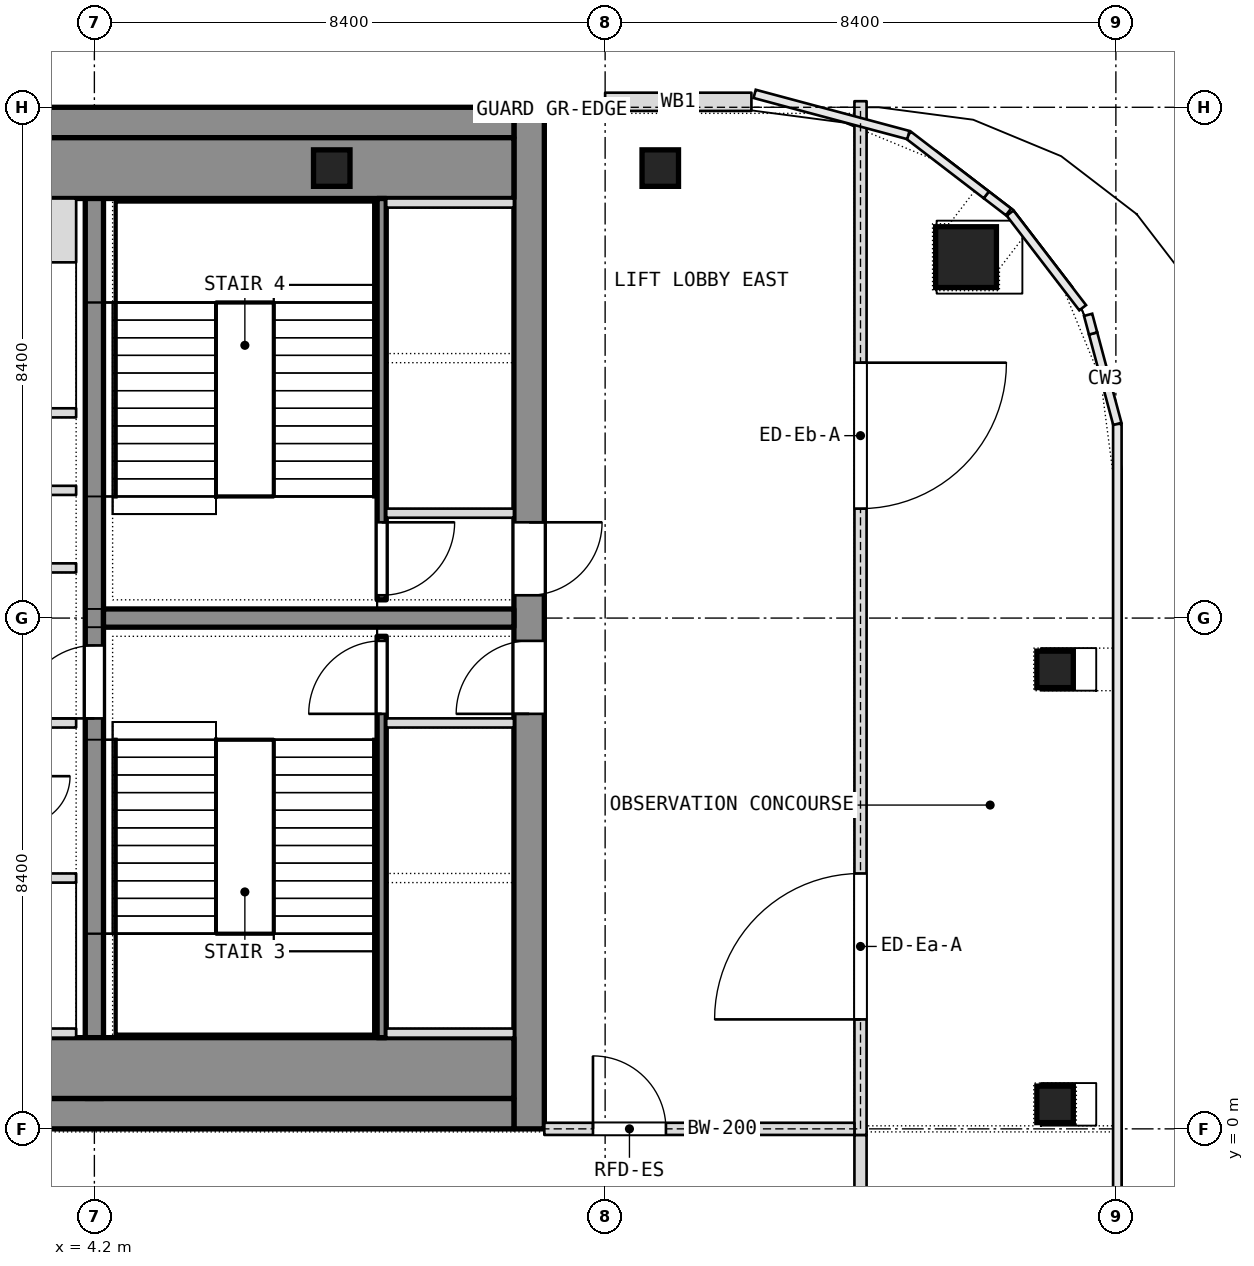
"""IFC4 building model, lengths in metres.
Left out: names, types, materials, properties, quantities, classifications, styles, units other than length and angle.
Written with IfcOpenShell. Run it as: python <this file> out.ifc"""

import sys

from ifc_helpers import new_model, si_unit, direction, frame, frame_2d, origin, origin_2d, place, context, subcontext, project, spatial, rectangle, extrude, element, fill, save


model = new_model("IFC4")
c1 = context("Model", 3, precision=1e-05, world=origin(), true_north=direction((0.0, 1.0)))
c2 = subcontext(c1, "Body", "Model", "MODEL_VIEW")
j1 = project(units=[si_unit("LENGTHUNIT", "METRE"), si_unit("PLANEANGLEUNIT", "RADIAN")], contexts=[c1])
p1 = place(None, origin())
s1 = spatial("IfcSite", under=j1, at=p1, CompositionType="ELEMENT")
p2 = place(p1, origin())
s2 = spatial("IfcBuilding", under=s1, at=p2, CompositionType="ELEMENT")
p3 = place(p2, frame((0.0, 0.0, 281.3)))
s3 = spatial("IfcBuildingStorey", under=s2, at=p3, CompositionType="ELEMENT", Elevation=281.3)
p4 = place(p3, frame((11.35, 0.0, 0.0), z_axis=(0.0, 0.0, 1.0), x_axis=(0.0, 1.0, 0.0)))
e1 = element("IfcWall", 1, at=p4, inside=s3, PredefinedType="SHEAR", context=c2, shape_type="SweptSolid", body=[
    extrude(rectangle(XDim=16.8, YDim=0.5, at=frame_2d((8.4, 0.0))), origin(), (0.0, 0.0, 1.0), 7.2),
])
p5 = place(p4, frame((6.825, 0.0, 0.0)))
e2 = element("IfcOpeningElement", 2, at=p5, cuts=e1, PredefinedType="OPENING", context=c2, shape_type="SweptSolid", body=[
    extrude(rectangle(XDim=1.2, YDim=2.1, at=frame_2d((0.6, 1.05))), frame((0.0, 0.25, 0.0), z_axis=(0.0, -1.0, 0.0), x_axis=(1.0, 0.0, 0.0)), (0.0, 0.0, 1.0), 0.5),
])
p6 = place(p4, frame((8.775, 0.0, 0.0)))
e3 = element("IfcOpeningElement", 3, at=p6, cuts=e1, PredefinedType="OPENING", context=c2, shape_type="SweptSolid", body=[
    extrude(rectangle(XDim=1.2, YDim=2.1, at=frame_2d((0.6, 1.05))), frame((0.0, 0.25, 0.0), z_axis=(0.0, -1.0, 0.0), x_axis=(1.0, 0.0, 0.0)), (0.0, 0.0, 1.0), 0.5),
])
p7 = place(p3, frame((-11.1, 0.25, 0.0), z_axis=(0.0, 0.0, 1.0), x_axis=(1.0, 0.0, 0.0)))
e4 = element("IfcWall", 4, at=p7, inside=s3, PredefinedType="SHEAR", context=c2, shape_type="SweptSolid", body=[
    extrude(rectangle(XDim=22.2, YDim=0.5, at=frame_2d((11.1, 0.0))), origin(), (0.0, 0.0, 1.0), 7.2),
])
p8 = place(p7, frame((10.85, 0.0, 0.0)))
e5 = element("IfcOpeningElement", 5, at=p8, cuts=e4, PredefinedType="OPENING", context=c2, shape_type="SweptSolid", body=[
    extrude(rectangle(XDim=1.4, YDim=2.1, at=frame_2d((0.7, 1.05))), frame((0.0, 0.25, 0.0), z_axis=(0.0, -1.0, 0.0), x_axis=(1.0, 0.0, 0.0)), (0.0, 0.0, 1.0), 0.5),
])
p9 = place(p3, frame((-11.1, 16.55, 0.0), z_axis=(0.0, 0.0, 1.0), x_axis=(1.0, 0.0, 0.0)))
e6 = element("IfcWall", 6, at=p9, inside=s3, PredefinedType="SHEAR", context=c2, shape_type="SweptSolid", body=[
    extrude(rectangle(XDim=22.2, YDim=0.5, at=frame_2d((11.1, 0.0))), origin(), (0.0, 0.0, 1.0), 7.2),
])
p10 = place(p3, frame((4.2, 0.5, 0.0), z_axis=(0.0, 0.0, 1.0), x_axis=(0.0, 1.0, 0.0)))
e7 = element("IfcWall", 7, at=p10, inside=s3, PredefinedType="SHEAR", context=c2, shape_type="SweptSolid", body=[
    extrude(rectangle(XDim=15.8, YDim=0.3, at=frame_2d((7.9, 0.0))), origin(), (0.0, 0.0, 1.0), 7.2),
])
p11 = place(p10, frame((6.25, 0.0, 0.0)))
e8 = element("IfcOpeningElement", 8, at=p11, cuts=e7, PredefinedType="OPENING", context=c2, shape_type="SweptSolid", body=[
    extrude(rectangle(XDim=1.2, YDim=2.1, at=frame_2d((0.6, 1.05))), frame((0.0, 0.15, 0.0), z_axis=(0.0, -1.0, 0.0), x_axis=(1.0, 0.0, 0.0)), (0.0, 0.0, 1.0), 0.3),
])
p12 = place(p3, frame((4.35, 8.4, 0.0), z_axis=(0.0, 0.0, 1.0), x_axis=(1.0, 0.0, 0.0)))
e9 = element("IfcWall", 9, at=p12, inside=s3, PredefinedType="SHEAR", context=c2, shape_type="SweptSolid", body=[
    extrude(rectangle(XDim=6.75, YDim=0.3, at=frame_2d((3.375, 0.0))), origin(), (0.0, 0.0, 1.0), 7.2),
])
p13 = place(p3, frame((18.535, 14.335, 0.0), z_axis=(0.0, 0.0, 1.0), x_axis=(1.0, 0.0, 0.0)))
e10 = element("IfcColumn", 10, at=p13, inside=s3, PredefinedType="COLUMN", context=c2, shape_type="SweptSolid", body=[
    extrude(rectangle(XDim=1.0, YDim=1.0, at=origin_2d()), origin(), (0.0, 0.0, 1.0), 7.2),
])
for number, where, z_axis, x_axis in (
    (11, (8.104, 15.8, 0.0), (0.0, 0.0, 1.0), (1.0, 0.0, 0.0)),
    (12, (13.507, 15.8, 0.0), (0.0, 0.0, 1.0), (1.0, 0.0, 0.0)),
    (13, (20.0, 7.556, 0.0), (0.0, 0.0, 1.0), (1.0, 0.0, 0.0)),
    (14, (20.0, 0.403, 0.0), (0.0, 0.0, 1.0), (1.0, 0.0, 0.0)),
):
    element("IfcColumn", number, at=place(p3, frame(where, z_axis=z_axis, x_axis=x_axis)), inside=s3, PredefinedType="COLUMN", context=c2, shape_type="SweptSolid", body=[
        extrude(rectangle(XDim=0.6, YDim=0.6, at=origin_2d()), origin(), (0.0, 0.0, 1.0), 7.2),
    ])
p14 = place(p3, frame((16.8, -13.7, 0.0), z_axis=(0.0, 0.0, 1.0), x_axis=(0.0, 1.0, 0.0)))
e15 = element("IfcWall", 15, at=p14, inside=s3, PredefinedType="PARTITIONING", context=c2, shape_type="SweptSolid", body=[
    extrude(rectangle(XDim=13.6, YDim=0.2, at=frame_2d((6.8, 0.0))), origin(), (0.0, 0.0, 1.0), 6.94),
])
p15 = place(p3, frame((15.006, 16.89, 0.0), z_axis=(0.0, 0.0, 1.0), x_axis=(-1.0, 0.0, 0.0)))
e16 = element("IfcWall", 16, at=p15, inside=s3, PredefinedType="NOTDEFINED", context=c2, shape_type="SweptSolid", body=[
    extrude(rectangle(XDim=2.406, YDim=0.3, at=frame_2d((1.203, 0.0))), origin(), (0.0, 0.0, 1.0), 7.2),
])
p16 = place(p3, frame((1.15, 1.0, 0.0), z_axis=(0.0, 0.0, 1.0), x_axis=(1.0, 0.0, 0.0)))
e17 = element("IfcWall", 17, at=p16, inside=s3, PredefinedType="PARTITIONING", context=c2, shape_type="SweptSolid", body=[
    extrude(rectangle(XDim=9.95, YDim=1.0, at=frame_2d((4.975, 0.0))), origin(), (0.0, 0.0, 1.0), 6.94),
])
p17 = place(p3, frame((-11.1, 15.8, 0.0), z_axis=(0.0, 0.0, 1.0), x_axis=(1.0, 0.0, 0.0)))
e18 = element("IfcWall", 18, at=p17, inside=s3, PredefinedType="PARTITIONING", context=c2, shape_type="SweptSolid", body=[
    extrude(rectangle(XDim=22.2, YDim=1.0, at=frame_2d((11.1, 0.0))), origin(), (0.0, 0.0, 1.0), 6.94),
])
p18 = place(p3, frame((8.925, 1.5, 0.0), z_axis=(0.0, 0.0, 1.0), x_axis=(0.0, 1.0, 0.0)))
e19 = element("IfcWall", 19, at=p18, inside=s3, PredefinedType="SHEAR", context=c2, shape_type="SweptSolid", body=[
    extrude(rectangle(XDim=6.6, YDim=0.15, at=frame_2d((3.3, 0.0))), origin(), (0.0, 0.0, 1.0), 6.94),
])
p19 = place(p18, frame((5.325, 0.0, 0.0)))
e20 = element("IfcOpeningElement", 20, at=p19, cuts=e19, PredefinedType="OPENING", context=c2, shape_type="SweptSolid", body=[
    extrude(rectangle(XDim=1.2, YDim=2.1, at=frame_2d((0.6, 1.05))), frame((0.0, 0.075, 0.0), z_axis=(0.0, -1.0, 0.0), x_axis=(1.0, 0.0, 0.0)), (0.0, 0.0, 1.0), 0.15),
])
for number, where, z_axis, x_axis in (
    (21, (9.0, 6.675, 0.0), (0.0, 0.0, 1.0), (1.0, 0.0, 0.0)),
    (22, (9.0, 1.575, 0.0), (0.0, 0.0, 1.0), (1.0, 0.0, 0.0)),
):
    element("IfcWall", number, at=place(p3, frame(where, z_axis=z_axis, x_axis=x_axis)), inside=s3, PredefinedType="SHEAR", context=c2, shape_type="SweptSolid", body=[
        extrude(rectangle(XDim=2.1, YDim=0.15, at=frame_2d((1.05, 0.0))), origin(), (0.0, 0.0, 1.0), 6.94),
    ])
p20 = place(p3, frame((8.925, 8.7, 0.0), z_axis=(0.0, 0.0, 1.0), x_axis=(0.0, 1.0, 0.0)))
e23 = element("IfcWall", 23, at=p20, inside=s3, PredefinedType="SHEAR", context=c2, shape_type="SweptSolid", body=[
    extrude(rectangle(XDim=6.6, YDim=0.15, at=frame_2d((3.3, 0.0))), origin(), (0.0, 0.0, 1.0), 6.94),
])
p21 = place(p20, frame((0.075, 0.0, 0.0)))
e24 = element("IfcOpeningElement", 24, at=p21, cuts=e23, PredefinedType="OPENING", context=c2, shape_type="SweptSolid", body=[
    extrude(rectangle(XDim=1.2, YDim=2.1, at=frame_2d((0.6, 1.05))), frame((0.0, 0.075, 0.0), z_axis=(0.0, -1.0, 0.0), x_axis=(1.0, 0.0, 0.0)), (0.0, 0.0, 1.0), 0.15),
])
for number, where, z_axis, x_axis in (
    (25, (9.0, 10.125, 0.0), (0.0, 0.0, 1.0), (1.0, 0.0, 0.0)),
    (26, (9.0, 15.225, 0.0), (0.0, 0.0, 1.0), (1.0, 0.0, 0.0)),
):
    element("IfcWall", number, at=place(p3, frame(where, z_axis=z_axis, x_axis=x_axis)), inside=s3, PredefinedType="SHEAR", context=c2, shape_type="SweptSolid", body=[
        extrude(rectangle(XDim=2.1, YDim=0.15, at=frame_2d((1.05, 0.0))), origin(), (0.0, 0.0, 1.0), 6.94),
    ])
p22 = place(p3, frame((-3.9, 4.125, 0.0), z_axis=(0.0, 0.0, 1.0), x_axis=(1.0, 0.0, 0.0)))
e27 = element("IfcWall", 27, at=p22, inside=s3, PredefinedType="PARTITIONING", context=c2, shape_type="SweptSolid", body=[
    extrude(rectangle(XDim=7.8, YDim=0.15, at=frame_2d((3.9, 0.0))), origin(), (0.0, 0.0, 1.0), 6.94),
])
p23 = place(p22, frame((3.75, 0.0, 0.0)))
e28 = element("IfcOpeningElement", 28, at=p23, cuts=e27, PredefinedType="OPENING", context=c2, shape_type="SweptSolid", body=[
    extrude(rectangle(XDim=1.2, YDim=2.1, at=frame_2d((0.6, 1.05))), frame((0.0, 0.075, 0.0), z_axis=(0.0, -1.0, 0.0), x_axis=(1.0, 0.0, 0.0)), (0.0, 0.0, 1.0), 0.15),
])
p24 = place(p3, frame((-3.9, 11.775, 0.0), z_axis=(0.0, 0.0, 1.0), x_axis=(1.0, 0.0, 0.0)))
e29 = element("IfcWall", 29, at=p24, inside=s3, PredefinedType="PARTITIONING", context=c2, shape_type="SweptSolid", body=[
    extrude(rectangle(XDim=7.8, YDim=0.15, at=frame_2d((3.9, 0.0))), origin(), (0.0, 0.0, 1.0), 6.94),
])
p25 = place(p24, frame((3.3, 0.0, 0.0)))
e30 = element("IfcOpeningElement", 30, at=p25, cuts=e29, PredefinedType="OPENING", context=c2, shape_type="SweptSolid", body=[
    extrude(rectangle(XDim=1.2, YDim=2.1, at=frame_2d((0.6, 1.05))), frame((0.0, 0.075, 0.0), z_axis=(0.0, -1.0, 0.0), x_axis=(1.0, 0.0, 0.0)), (0.0, 0.0, 1.0), 0.15),
])
p26 = place(p3, frame((1.65, 1.575, 0.0), z_axis=(0.0, 0.0, 1.0), x_axis=(1.0, 0.0, 0.0)))
e31 = element("IfcWall", 31, at=p26, inside=s3, PredefinedType="SHEAR", context=c2, shape_type="SweptSolid", body=[
    extrude(rectangle(XDim=2.25, YDim=0.15, at=frame_2d((1.125, 0.0))), origin(), (0.0, 0.0, 1.0), 7.2),
])
p27 = place(p3, frame((1.65, 14.775, 0.0), z_axis=(0.0, 0.0, 1.0), x_axis=(1.0, 0.0, 0.0)))
e32 = element("IfcWall", 32, at=p27, inside=s3, PredefinedType="SHEAR", context=c2, shape_type="SweptSolid", body=[
    extrude(rectangle(XDim=2.25, YDim=1.05, at=frame_2d((1.125, 0.0))), origin(), (0.0, 0.0, 1.0), 7.2),
])
for number, where, z_axis, x_axis in (
    (33, (1.65, 6.675, 0.0), (0.0, 0.0, 1.0), (1.0, 0.0, 0.0)),
    (34, (1.65, 9.225, 0.0), (0.0, 0.0, 1.0), (1.0, 0.0, 0.0)),
):
    element("IfcWall", number, at=place(p3, frame(where, z_axis=z_axis, x_axis=x_axis)), inside=s3, PredefinedType="PARTITIONING", context=c2, shape_type="SweptSolid", body=[
        extrude(rectangle(XDim=2.25, YDim=0.15, at=frame_2d((1.125, 0.0))), origin(), (0.0, 0.0, 1.0), 6.94),
    ])
p28 = place(p3, frame((1.8, 10.5, 0.0), z_axis=(0.0, 0.0, 1.0), x_axis=(1.0, 0.0, 0.0)))
e35 = element("IfcWall", 35, at=p28, inside=s3, PredefinedType="PARTITIONING", context=c2, shape_type="SweptSolid", body=[
    extrude(rectangle(XDim=2.1, YDim=0.15, at=frame_2d((1.05, 0.0))), origin(), (0.0, 0.0, 1.0), 6.94),
])
p29 = place(p3, frame((16.8, -0.1, 0.0), z_axis=(0.0, 0.0, 1.0), x_axis=(0.0, 1.0, 0.0)))
e36 = element("IfcWall", 36, at=p29, inside=s3, PredefinedType="PARTITIONING", context=c2, shape_type="SweptSolid", body=[
    extrude(rectangle(XDim=17.0, YDim=0.2, at=frame_2d((8.5, 0.0))), origin(), (0.0, 0.0, 1.0), 6.94),
])
p30 = place(p29, frame((1.9, 0.0, 0.0)))
e37 = element("IfcOpeningElement", 37, at=p30, cuts=e36, PredefinedType="OPENING", context=c2, shape_type="SweptSolid", body=[
    extrude(rectangle(XDim=2.4, YDim=2.1, at=frame_2d((1.2, 1.05))), frame((0.0, 0.1, 0.0), z_axis=(0.0, -1.0, 0.0), x_axis=(1.0, 0.0, 0.0)), (0.0, 0.0, 1.0), 0.2),
])
p31 = place(p29, frame((10.3, 0.0, 0.0)))
e38 = element("IfcOpeningElement", 38, at=p31, cuts=e36, PredefinedType="OPENING", context=c2, shape_type="SweptSolid", body=[
    extrude(rectangle(XDim=2.4, YDim=2.1, at=frame_2d((1.2, 1.05))), frame((0.0, 0.1, 0.0), z_axis=(0.0, -1.0, 0.0), x_axis=(1.0, 0.0, 0.0)), (0.0, 0.0, 1.0), 0.2),
])
p32 = place(p3, frame((11.6, 0.0, 0.0), z_axis=(0.0, 0.0, 1.0), x_axis=(1.0, 0.0, 0.0)))
e39 = element("IfcWall", 39, at=p32, inside=s3, PredefinedType="PARTITIONING", context=c2, shape_type="SweptSolid", body=[
    extrude(rectangle(XDim=5.1, YDim=0.2, at=frame_2d((2.55, 0.0))), origin(), (0.0, 0.0, 1.0), 6.6),
])
p33 = place(p32, frame((0.8, 0.0, 0.0)))
e40 = element("IfcOpeningElement", 40, at=p33, cuts=e39, PredefinedType="OPENING", context=c2, shape_type="SweptSolid", body=[
    extrude(rectangle(XDim=1.2, YDim=2.1, at=frame_2d((0.6, 1.05))), frame((0.0, 0.1, 0.0), z_axis=(0.0, -1.0, 0.0), x_axis=(1.0, 0.0, 0.0)), (0.0, 0.0, 1.0), 0.2),
])
p34 = place(p5, origin())
e41 = element("IfcDoor", 41, at=p34, inside=s3, OperationType="SINGLE_SWING_LEFT", PredefinedType="DOOR", context=c2, shape_type="SweptSolid", body=[
    extrude(rectangle(XDim=1.2, YDim=2.1, at=frame_2d((0.6, 1.05))), frame((0.0, 0.025, 0.0), z_axis=(0.0, -1.0, 0.0), x_axis=(1.0, 0.0, 0.0)), (0.0, 0.0, 1.0), 0.05),
])
fill(e2, e41)
p35 = place(p19, origin())
e42 = element("IfcDoor", 42, at=p35, inside=s3, OperationType="SINGLE_SWING_LEFT", PredefinedType="DOOR", context=c2, shape_type="SweptSolid", body=[
    extrude(rectangle(XDim=1.2, YDim=2.1, at=frame_2d((0.6, 1.05))), frame((0.0, 0.025, 0.0), z_axis=(0.0, -1.0, 0.0), x_axis=(1.0, 0.0, 0.0)), (0.0, 0.0, 1.0), 0.05),
])
fill(e20, e42)
p36 = place(p6, origin())
e43 = element("IfcDoor", 43, at=p36, inside=s3, OperationType="SINGLE_SWING_LEFT", PredefinedType="DOOR", context=c2, shape_type="SweptSolid", body=[
    extrude(rectangle(XDim=1.2, YDim=2.1, at=frame_2d((0.6, 1.05))), frame((0.0, 0.025, 0.0), z_axis=(0.0, -1.0, 0.0), x_axis=(1.0, 0.0, 0.0)), (0.0, 0.0, 1.0), 0.05),
])
fill(e3, e43)
p37 = place(p21, origin())
e44 = element("IfcDoor", 44, at=p37, inside=s3, OperationType="SINGLE_SWING_LEFT", PredefinedType="DOOR", context=c2, shape_type="SweptSolid", body=[
    extrude(rectangle(XDim=1.2, YDim=2.1, at=frame_2d((0.6, 1.05))), frame((0.0, 0.025, 0.0), z_axis=(0.0, -1.0, 0.0), x_axis=(1.0, 0.0, 0.0)), (0.0, 0.0, 1.0), 0.05),
])
fill(e24, e44)
p38 = place(p11, origin())
e45 = element("IfcDoor", 45, at=p38, inside=s3, OperationType="SINGLE_SWING_LEFT", PredefinedType="DOOR", context=c2, shape_type="SweptSolid", body=[
    extrude(rectangle(XDim=1.2, YDim=2.1, at=frame_2d((0.6, 1.05))), frame((0.0, 0.025, 0.0), z_axis=(0.0, -1.0, 0.0), x_axis=(1.0, 0.0, 0.0)), (0.0, 0.0, 1.0), 0.05),
])
fill(e8, e45)
p39 = place(p30, origin())
e46 = element("IfcDoor", 46, at=p39, inside=s3, OperationType="DOUBLE_DOOR_SINGLE_SWING", PredefinedType="DOOR", context=c2, shape_type="SweptSolid", body=[
    extrude(rectangle(XDim=2.4, YDim=2.1, at=frame_2d((1.2, 1.05))), frame((0.0, 0.025, 0.0), z_axis=(0.0, -1.0, 0.0), x_axis=(1.0, 0.0, 0.0)), (0.0, 0.0, 1.0), 0.05),
])
fill(e37, e46)
p40 = place(p31, origin())
e47 = element("IfcDoor", 47, at=p40, inside=s3, OperationType="DOUBLE_DOOR_SINGLE_SWING", PredefinedType="DOOR", context=c2, shape_type="SweptSolid", body=[
    extrude(rectangle(XDim=2.4, YDim=2.1, at=frame_2d((1.2, 1.05))), frame((0.0, 0.025, 0.0), z_axis=(0.0, -1.0, 0.0), x_axis=(1.0, 0.0, 0.0)), (0.0, 0.0, 1.0), 0.05),
])
fill(e38, e47)
p41 = place(p33, origin())
e48 = element("IfcDoor", 48, at=p41, inside=s3, OperationType="SINGLE_SWING_LEFT", PredefinedType="DOOR", context=c2, shape_type="SweptSolid", body=[
    extrude(rectangle(XDim=1.2, YDim=2.1, at=frame_2d((0.6, 1.05))), frame((0.0, 0.025, 0.0), z_axis=(0.0, -1.0, 0.0), x_axis=(1.0, 0.0, 0.0)), (0.0, 0.0, 1.0), 0.05),
])
fill(e40, e48)
save(model, sys.argv[1])
